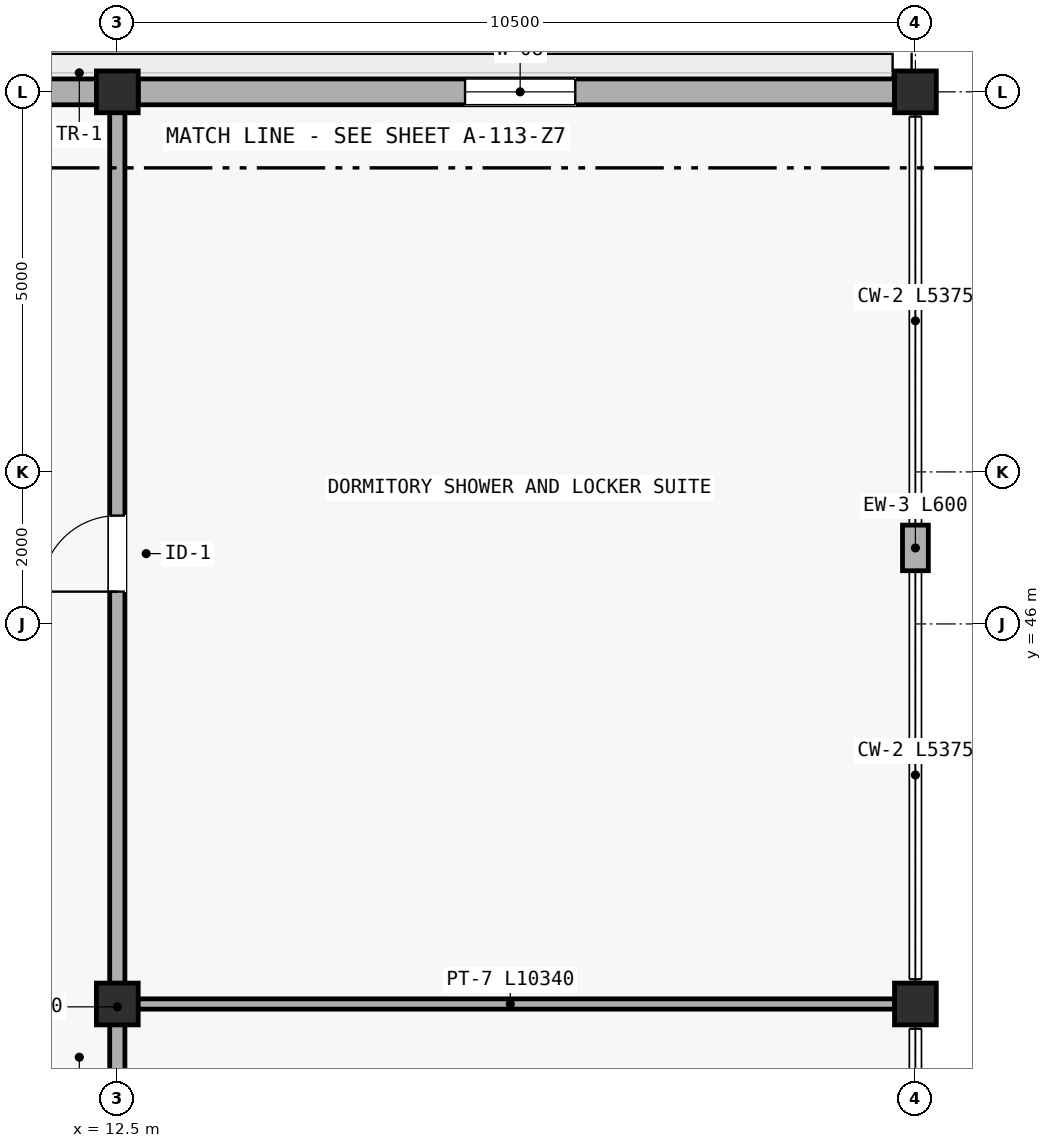
"""IFC4 building model, lengths in metres.
Left out: names, types, materials, properties, quantities, classifications, styles, units other than length and angle.
Written with IfcOpenShell. Run it as: python <this file> out.ifc"""

import sys

from ifc_helpers import new_model, si_unit, direction, frame, frame_2d, origin, origin_2d, place, context, subcontext, project, spatial, rectangle, extrude, element, fill, save


model = new_model("IFC4")
c1 = context("Model", 3, precision=1e-05, world=origin(), true_north=direction((0.0, 1.0)))
c2 = subcontext(c1, "Body", "Model", "MODEL_VIEW")
j1 = project(units=[si_unit("LENGTHUNIT", "METRE"), si_unit("PLANEANGLEUNIT", "RADIAN")], contexts=[c1])
p1 = place(None, origin())
s1 = spatial("IfcSite", under=j1, at=p1, CompositionType="ELEMENT")
p2 = place(p1, origin())
s2 = spatial("IfcBuilding", under=s1, at=p2, CompositionType="ELEMENT")
p3 = place(p2, frame((0.0, 0.0, 9.3)))
s3 = spatial("IfcBuildingStorey", under=s2, at=p3, CompositionType="ELEMENT", Elevation=9.3)
for number, where, z_axis, x_axis in (
    (1, (12.5, 41.0, 0.0), (0.0, 0.0, 1.0), (1.0, 0.0, 0.0)),
    (2, (12.5, 53.0, 0.0), (0.0, 0.0, 1.0), (1.0, 0.0, 0.0)),
    (3, (23.0, 41.0, 0.0), (0.0, 0.0, 1.0), (1.0, 0.0, 0.0)),
    (4, (23.0, 53.0, 0.0), (0.0, 0.0, 1.0), (1.0, 0.0, 0.0)),
):
    element("IfcColumn", number, at=place(p3, frame(where, z_axis=z_axis, x_axis=x_axis)), inside=s3, PredefinedType="COLUMN", context=c2, shape_type="SweptSolid", body=[
        extrude(rectangle(XDim=0.55, YDim=0.55, at=origin_2d()), origin(), (0.0, 0.0, 1.0), 3.45),
    ])
p4 = place(p3, frame((12.225, 53.0, 0.0), z_axis=(0.0, 0.0, 1.0), x_axis=(-1.0, 0.0, 0.0)))
e5 = element("IfcWall", 5, at=p4, inside=s3, PredefinedType="STANDARD", context=c2, shape_type="SweptSolid", body=[
    extrude(rectangle(XDim=3.45, YDim=0.34, at=frame_2d((1.725, 0.0))), origin(), (0.0, 0.0, 1.0), 2.75),
])
p5 = place(p4, frame((1.025, 0.0, 0.0)))
e6 = element("IfcOpeningElement", 6, at=p5, cuts=e5, PredefinedType="OPENING", context=c2, shape_type="SweptSolid", body=[
    extrude(rectangle(XDim=1.08, YDim=2.1, at=frame_2d((0.54, 1.05))), frame((0.0, 0.18, 0.0), z_axis=(0.0, -1.0, 0.0), x_axis=(1.0, 0.0, 0.0)), (0.0, 0.0, 1.0), 0.36),
])
p6 = place(p3, frame((22.725, 53.0, 0.0), z_axis=(0.0, 0.0, 1.0), x_axis=(-1.0, 0.0, 0.0)))
e7 = element("IfcWall", 7, at=p6, inside=s3, PredefinedType="STANDARD", context=c2, shape_type="SweptSolid", body=[
    extrude(rectangle(XDim=9.95, YDim=0.34, at=frame_2d((4.975, 0.0))), origin(), (0.0, 0.0, 1.0), 2.75),
])
p7 = place(p6, frame((4.2, 0.0, 0.75)))
e8 = element("IfcOpeningElement", 8, at=p7, cuts=e7, PredefinedType="OPENING", context=c2, shape_type="SweptSolid", body=[
    extrude(rectangle(XDim=1.45, YDim=1.25, at=frame_2d((0.725, 0.625))), frame((0.0, 0.18, 0.0), z_axis=(0.0, -1.0, 0.0), x_axis=(1.0, 0.0, 0.0)), (0.0, 0.0, 1.0), 0.36),
])
p8 = place(p3, frame((23.0, 46.7, 0.0), z_axis=(0.0, 0.0, 1.0), x_axis=(0.0, 1.0, 0.0)))
e9 = element("IfcWall", 9, at=p8, inside=s3, PredefinedType="STANDARD", context=c2, shape_type="SweptSolid", body=[
    extrude(rectangle(XDim=0.6, YDim=0.34, at=frame_2d((0.3, 0.0))), origin(), (0.0, 0.0, 1.0), 2.75),
])
p9 = place(p3, frame((12.5, 29.0, 0.0), z_axis=(0.0, 0.0, 1.0), x_axis=(0.0, 1.0, 0.0)))
e10 = element("IfcWall", 10, at=p9, inside=s3, PredefinedType="PARTITIONING", context=c2, shape_type="SweptSolid", body=[
    extrude(rectangle(XDim=12.0, YDim=0.2, at=frame_2d((6.0, 0.0))), origin(), (0.0, 0.0, 1.0), 2.7),
])
p10 = place(p9, frame((5.49, 0.0, 0.0)))
e11 = element("IfcOpeningElement", 11, at=p10, cuts=e10, PredefinedType="OPENING", context=c2, shape_type="SweptSolid", body=[
    extrude(rectangle(XDim=1.02, YDim=2.14, at=frame_2d((0.51, 1.07))), frame((0.0, 0.11, 0.0), z_axis=(0.0, -1.0, 0.0), x_axis=(1.0, 0.0, 0.0)), (0.0, 0.0, 1.0), 0.22),
])
p11 = place(p3, frame((12.5, 41.0, 0.0), z_axis=(0.0, 0.0, 1.0), x_axis=(0.0, 1.0, 0.0)))
e12 = element("IfcWall", 12, at=p11, inside=s3, PredefinedType="PARTITIONING", context=c2, shape_type="SweptSolid", body=[
    extrude(rectangle(XDim=11.85, YDim=0.2, at=frame_2d((5.925, 0.0))), origin(), (0.0, 0.0, 1.0), 2.7),
])
p12 = place(p11, frame((5.425, 0.0, 0.0)))
e13 = element("IfcOpeningElement", 13, at=p12, cuts=e12, PredefinedType="OPENING", context=c2, shape_type="SweptSolid", body=[
    extrude(rectangle(XDim=1.0, YDim=2.12, at=frame_2d((0.5, 1.06))), frame((0.0, 0.11, 0.0), z_axis=(0.0, -1.0, 0.0), x_axis=(1.0, 0.0, 0.0)), (0.0, 0.0, 1.0), 0.22),
])
p13 = place(p3, frame((12.5, 41.0, 0.0), z_axis=(0.0, 0.0, 1.0), x_axis=(1.0, 0.0, 0.0)))
e14 = element("IfcWall", 14, at=p13, inside=s3, PredefinedType="PARTITIONING", context=c2, shape_type="SweptSolid", body=[
    extrude(rectangle(XDim=10.34, YDim=0.135, at=frame_2d((5.17, 0.0))), origin(), (0.0, 0.0, 1.0), 2.7),
])
p14 = place(p7, origin())
e15 = element("IfcWindow", 15, at=p14, inside=s3, PartitioningType="DOUBLE_PANEL_HORIZONTAL", PredefinedType="WINDOW", context=c2, shape_type="SweptSolid", body=[
    extrude(rectangle(XDim=1.45, YDim=1.25, at=frame_2d((0.725, 0.625))), frame((0.0, 0.03, 0.0), z_axis=(0.0, -1.0, 0.0), x_axis=(1.0, 0.0, 0.0)), (0.0, 0.0, 1.0), 0.06),
])
fill(e8, e15)
p15 = place(p12, origin())
e16 = element("IfcDoor", 16, at=p15, inside=s3, OperationType="SINGLE_SWING_LEFT", PredefinedType="DOOR", context=c2, shape_type="SweptSolid", body=[
    extrude(rectangle(XDim=1.0, YDim=2.12, at=frame_2d((0.5, 1.06))), frame((0.0, 0.025, 0.0), z_axis=(0.0, -1.0, 0.0), x_axis=(1.0, 0.0, 0.0)), (0.0, 0.0, 1.0), 0.05),
])
fill(e13, e16)
save(model, sys.argv[1])
